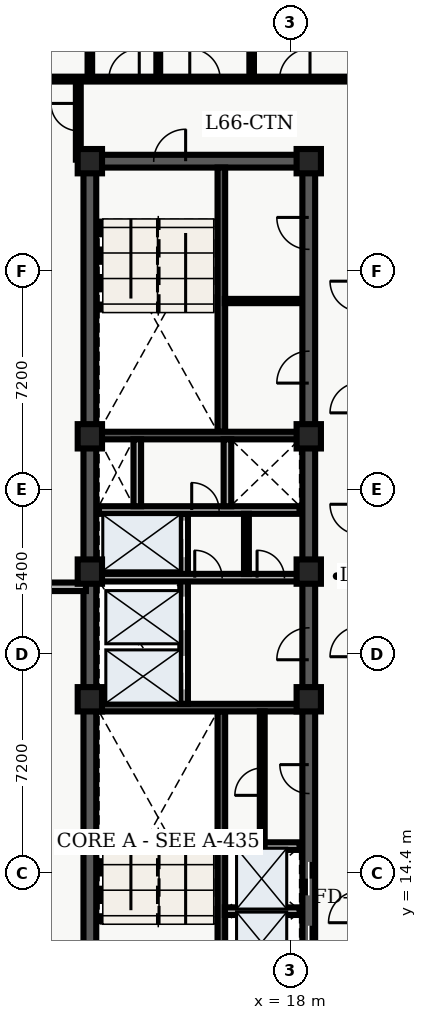
"""IFC4 building model, lengths in metres.
Left out: names, types, materials, properties, quantities, classifications, styles, units other than length and angle.
Written with IfcOpenShell. Run it as: python <this file> out.ifc"""

import sys

from ifc_helpers import new_model, entity, si_unit, converted_unit, direction, frame, origin_with_axes, origin_2d_with_axis, place, context, subcontext, project, spatial, polyline, rectangle, outline, extrude, element, fill, save


model = new_model("IFC4")
c1 = context("Model", 3, precision=1e-05, world=origin_with_axes(), true_north=direction((0.0, 1.0)))
c2 = subcontext(c1, "Body", "Model", "MODEL_VIEW")
j1 = project(units=[si_unit("LENGTHUNIT", "METRE"), converted_unit("PLANEANGLEUNIT", "DEGREE", entity("IfcPlaneAngleMeasure", 0.017), si_unit("PLANEANGLEUNIT", "RADIAN"), dimensions=[0, 0, 0, 0, 0, 0, 0])], contexts=[c1])
p1 = place(None, origin_with_axes())
s1 = spatial("IfcSite", under=j1, at=p1, CompositionType="ELEMENT")
p2 = place(p1, origin_with_axes())
s2 = spatial("IfcBuilding", under=s1, at=p2, CompositionType="ELEMENT")
p3 = place(p2, frame((0.0, 0.0, 268.5), z_axis=(0.0, 0.0, 1.0), x_axis=(1.0, 0.0, 0.0)))
s3 = spatial("IfcBuildingStorey", under=s2, at=p3, CompositionType="ELEMENT", Elevation=268.5)
p4 = place(p3, frame((11.4, 10.8, 0.0), z_axis=(0.0, 0.0, 1.0), x_axis=(0.0, 1.0, 0.0)))
e1 = element("IfcWall", 1, at=p4, inside=s3, PredefinedType="SHEAR", context=c2, shape_type="SweptSolid", body=[
    extrude(outline(polyline([(0.0, -0.21), (27.0, -0.21), (27.0, 0.21), (0.0, 0.21), (0.0, -0.21)])), origin_with_axes(), (0.0, 0.0, 1.0), 3.66),
])
p5 = place(p3, frame((11.4, 37.8, 0.0), z_axis=(0.0, 0.0, 1.0), x_axis=(1.0, 0.0, 0.0)))
e2 = element("IfcWall", 2, at=p5, inside=s3, PredefinedType="SHEAR", context=c2, shape_type="SweptSolid", body=[
    extrude(outline(polyline([(0.0, -0.21), (7.2, -0.21), (7.2, 0.21), (0.0, 0.21), (0.0, -0.21)])), origin_with_axes(), (0.0, 0.0, 1.0), 3.66),
])
p6 = place(p5, frame((2.625, 0.0, 0.0), z_axis=(0.0, 0.0, 1.0), x_axis=(1.0, 0.0, 0.0)))
e3 = element("IfcOpeningElement", 3, at=p6, cuts=e2, PredefinedType="OPENING", context=c2, shape_type="SweptSolid", body=[
    extrude(rectangle(XDim=1.05, YDim=0.44, at=origin_2d_with_axis()), origin_with_axes(), (0.0, 0.0, 1.0), 2.15),
])
p7 = place(p3, frame((18.6, 10.8, 0.0), z_axis=(0.0, 0.0, 1.0), x_axis=(0.0, 1.0, 0.0)))
e4 = element("IfcWall", 4, at=p7, inside=s3, PredefinedType="SHEAR", context=c2, shape_type="SweptSolid", body=[
    extrude(outline(polyline([(0.0, -0.21), (13.5, -0.21), (13.5, 0.21), (0.0, 0.21), (0.0, -0.21)])), origin_with_axes(), (0.0, 0.0, 1.0), 3.66),
])
p8 = place(p7, frame((1.3, 0.0, 0.0), z_axis=(0.0, 0.0, 1.0), x_axis=(1.0, 0.0, 0.0)))
e5 = element("IfcOpeningElement", 5, at=p8, cuts=e4, PredefinedType="OPENING", context=c2, shape_type="SweptSolid", body=[
    extrude(rectangle(XDim=1.1, YDim=0.44, at=origin_2d_with_axis()), origin_with_axes(), (0.0, 0.0, 1.0), 2.15),
])
p9 = place(p7, frame((3.4, 0.0, 0.0), z_axis=(0.0, 0.0, 1.0), x_axis=(1.0, 0.0, 0.0)))
e6 = element("IfcOpeningElement", 6, at=p9, cuts=e4, PredefinedType="OPENING", context=c2, shape_type="SweptSolid", body=[
    extrude(rectangle(XDim=1.1, YDim=0.44, at=origin_2d_with_axis()), origin_with_axes(), (0.0, 0.0, 1.0), 2.15),
])
p10 = place(p7, frame((11.125, 0.0, 0.0), z_axis=(0.0, 0.0, 1.0), x_axis=(1.0, 0.0, 0.0)))
e7 = element("IfcOpeningElement", 7, at=p10, cuts=e4, PredefinedType="OPENING", context=c2, shape_type="SweptSolid", body=[
    extrude(rectangle(XDim=1.05, YDim=0.44, at=origin_2d_with_axis()), origin_with_axes(), (0.0, 0.0, 1.0), 2.15),
])
p11 = place(p7, frame((6.675, 0.0, 0.0), z_axis=(0.0, 0.0, 1.0), x_axis=(1.0, 0.0, 0.0)))
e8 = element("IfcOpeningElement", 8, at=p11, cuts=e4, PredefinedType="OPENING", context=c2, shape_type="SweptSolid", body=[
    extrude(rectangle(XDim=0.95, YDim=0.44, at=origin_2d_with_axis()), origin_with_axes(), (0.0, 0.0, 1.0), 2.15),
])
p12 = place(p3, frame((18.6, 24.3, 0.0), z_axis=(0.0, 0.0, 1.0), x_axis=(0.0, 1.0, 0.0)))
e9 = element("IfcWall", 9, at=p12, inside=s3, PredefinedType="SHEAR", context=c2, shape_type="SweptSolid", body=[
    extrude(outline(polyline([(0.0, -0.21), (13.5, -0.21), (13.5, 0.21), (0.0, 0.21), (0.0, -0.21)])), origin_with_axes(), (0.0, 0.0, 1.0), 3.66),
])
p13 = place(p12, frame((6.725, 0.0, 0.0), z_axis=(0.0, 0.0, 1.0), x_axis=(1.0, 0.0, 0.0)))
e10 = element("IfcOpeningElement", 10, at=p13, cuts=e9, PredefinedType="OPENING", context=c2, shape_type="SweptSolid", body=[
    extrude(rectangle(XDim=1.05, YDim=0.44, at=origin_2d_with_axis()), origin_with_axes(), (0.0, 0.0, 1.0), 2.15),
])
p14 = place(p12, frame((11.125, 0.0, 0.0), z_axis=(0.0, 0.0, 1.0), x_axis=(1.0, 0.0, 0.0)))
e11 = element("IfcOpeningElement", 11, at=p14, cuts=e9, PredefinedType="OPENING", context=c2, shape_type="SweptSolid", body=[
    extrude(rectangle(XDim=1.05, YDim=0.44, at=origin_2d_with_axis()), origin_with_axes(), (0.0, 0.0, 1.0), 2.15),
])
p15 = place(p3, frame((15.725, 11.01, 0.0), z_axis=(0.0, 0.0, 1.0), x_axis=(0.0, 1.0, 0.0)))
e12 = element("IfcWall", 12, at=p15, inside=s3, PredefinedType="SHEAR", context=c2, shape_type="SweptSolid", body=[
    extrude(outline(polyline([(0.0, -0.125), (8.69, -0.125), (8.69, 0.125), (0.0, 0.125), (0.0, -0.125)])), origin_with_axes(), (0.0, 0.0, 1.0), 3.66),
])
p16 = place(p3, frame((11.61, 19.825, 0.0), z_axis=(0.0, 0.0, 1.0), x_axis=(1.0, 0.0, 0.0)))
e13 = element("IfcWall", 13, at=p16, inside=s3, PredefinedType="SHEAR", context=c2, shape_type="SweptSolid", body=[
    extrude(outline(polyline([(0.0, -0.125), (6.78, -0.125), (6.78, 0.125), (0.0, 0.125), (0.0, -0.125)])), origin_with_axes(), (0.0, 0.0, 1.0), 3.66),
])
p17 = place(p3, frame((15.725, 28.9, 0.0), z_axis=(0.0, 0.0, 1.0), x_axis=(0.0, 1.0, 0.0)))
e14 = element("IfcWall", 14, at=p17, inside=s3, PredefinedType="SHEAR", context=c2, shape_type="SweptSolid", body=[
    extrude(outline(polyline([(0.0, -0.125), (8.69, -0.125), (8.69, 0.125), (0.0, 0.125), (0.0, -0.125)])), origin_with_axes(), (0.0, 0.0, 1.0), 3.66),
])
p18 = place(p3, frame((11.61, 28.775, 0.0), z_axis=(0.0, 0.0, 1.0), x_axis=(1.0, 0.0, 0.0)))
e15 = element("IfcWall", 15, at=p18, inside=s3, PredefinedType="SHEAR", context=c2, shape_type="SweptSolid", body=[
    extrude(outline(polyline([(0.0, -0.125), (6.78, -0.125), (6.78, 0.125), (0.0, 0.125), (0.0, -0.125)])), origin_with_axes(), (0.0, 0.0, 1.0), 3.66),
])
p19 = place(p3, frame((14.5, 19.95, 0.0), z_axis=(0.0, 0.0, 1.0), x_axis=(0.0, 1.0, 0.0)))
e16 = element("IfcWall", 16, at=p19, inside=s3, PredefinedType="SOLIDWALL", context=c2, shape_type="SweptSolid", body=[
    extrude(outline(polyline([(0.0, -0.125), (6.25, -0.125), (6.25, 0.125), (0.0, 0.125), (0.0, -0.125)])), origin_with_axes(), (0.0, 0.0, 1.0), 2.7),
])
p20 = place(p19, frame((1.025, 0.0, 0.0), z_axis=(0.0, 0.0, 1.0), x_axis=(1.0, 0.0, 0.0)))
e17 = element("IfcOpeningElement", 17, at=p20, cuts=e16, PredefinedType="OPENING", context=c2, shape_type="SweptSolid", body=[
    extrude(rectangle(XDim=1.1, YDim=0.27, at=origin_2d_with_axis()), origin_with_axes(), (0.0, 0.0, 1.0), 2.15),
])
p21 = place(p19, frame((2.975, 0.0, 0.0), z_axis=(0.0, 0.0, 1.0), x_axis=(1.0, 0.0, 0.0)))
e18 = element("IfcOpeningElement", 18, at=p21, cuts=e16, PredefinedType="OPENING", context=c2, shape_type="SweptSolid", body=[
    extrude(rectangle(XDim=1.1, YDim=0.27, at=origin_2d_with_axis()), origin_with_axes(), (0.0, 0.0, 1.0), 2.15),
])
p22 = place(p19, frame((5.425, 0.0, 0.0), z_axis=(0.0, 0.0, 1.0), x_axis=(1.0, 0.0, 0.0)))
e19 = element("IfcOpeningElement", 19, at=p22, cuts=e16, PredefinedType="OPENING", context=c2, shape_type="SweptSolid", body=[
    extrude(rectangle(XDim=1.2, YDim=0.27, at=origin_2d_with_axis()), origin_with_axes(), (0.0, 0.0, 1.0), 2.15),
])
p23 = place(p3, frame((11.7, 24.1, 0.0), z_axis=(0.0, 0.0, 1.0), x_axis=(1.0, 0.0, 0.0)))
e20 = element("IfcWall", 20, at=p23, inside=s3, PredefinedType="SOLIDWALL", context=c2, shape_type="SweptSolid", body=[
    extrude(outline(polyline([(0.0, -0.125), (6.6, -0.125), (6.6, 0.125), (0.0, 0.125), (0.0, -0.125)])), origin_with_axes(), (0.0, 0.0, 1.0), 2.7),
])
p24 = place(p23, frame((3.6, 0.0, 0.0), z_axis=(0.0, 0.0, 1.0), x_axis=(1.0, 0.0, 0.0)))
e21 = element("IfcOpeningElement", 21, at=p24, cuts=e20, PredefinedType="OPENING", context=c2, shape_type="SweptSolid", body=[
    extrude(rectangle(XDim=0.9, YDim=0.27, at=origin_2d_with_axis()), origin_with_axes(), (0.0, 0.0, 1.0), 2.15),
])
p25 = place(p23, frame((5.65, 0.0, 0.0), z_axis=(0.0, 0.0, 1.0), x_axis=(1.0, 0.0, 0.0)))
e22 = element("IfcOpeningElement", 22, at=p25, cuts=e20, PredefinedType="OPENING", context=c2, shape_type="SweptSolid", body=[
    extrude(rectangle(XDim=0.9, YDim=0.27, at=origin_2d_with_axis()), origin_with_axes(), (0.0, 0.0, 1.0), 2.15),
])
p26 = place(p3, frame((11.7, 26.325, 0.0), z_axis=(0.0, 0.0, 1.0), x_axis=(1.0, 0.0, 0.0)))
e23 = element("IfcWall", 23, at=p26, inside=s3, PredefinedType="SOLIDWALL", context=c2, shape_type="SweptSolid", body=[
    extrude(outline(polyline([(0.0, -0.125), (6.6, -0.125), (6.6, 0.125), (0.0, 0.125), (0.0, -0.125)])), origin_with_axes(), (0.0, 0.0, 1.0), 2.7),
])
p27 = place(p26, frame((3.5, 0.0, 0.0), z_axis=(0.0, 0.0, 1.0), x_axis=(1.0, 0.0, 0.0)))
e24 = element("IfcOpeningElement", 24, at=p27, cuts=e23, PredefinedType="OPENING", context=c2, shape_type="SweptSolid", body=[
    extrude(rectangle(XDim=0.9, YDim=0.27, at=origin_2d_with_axis()), origin_with_axes(), (0.0, 0.0, 1.0), 2.15),
])
for number, where, z_axis, x_axis in (
    (25, (12.96, 26.45, 0.0), (0.0, 0.0, 1.0), (0.0, 1.0, 0.0)),
    (26, (15.925, 26.45, 0.0), (0.0, 0.0, 1.0), (0.0, 1.0, 0.0)),
):
    element("IfcWall", number, at=place(p3, frame(where, z_axis=z_axis, x_axis=x_axis)), inside=s3, PredefinedType="SOLIDWALL", context=c2, shape_type="SweptSolid", body=[
        extrude(outline(polyline([(0.0, -0.125), (2.2, -0.125), (2.2, 0.125), (0.0, 0.125), (0.0, -0.125)])), origin_with_axes(), (0.0, 0.0, 1.0), 2.7),
    ])
for number, where, z_axis, x_axis in (
    (27, (11.4, 20.1, 0.0), (0.0, 0.0, 1.0), (1.0, 0.0, 0.0)),
    (28, (11.4, 24.3, 0.0), (0.0, 0.0, 1.0), (1.0, 0.0, 0.0)),
    (29, (11.4, 28.75, 0.0), (0.0, 0.0, 1.0), (1.0, 0.0, 0.0)),
    (30, (11.4, 37.8, 0.0), (0.0, 0.0, 1.0), (1.0, 0.0, 0.0)),
    (31, (18.6, 20.1, 0.0), (0.0, 0.0, 1.0), (1.0, 0.0, 0.0)),
    (32, (18.6, 24.3, 0.0), (0.0, 0.0, 1.0), (1.0, 0.0, 0.0)),
    (33, (18.6, 28.75, 0.0), (0.0, 0.0, 1.0), (1.0, 0.0, 0.0)),
    (34, (18.6, 37.8, 0.0), (0.0, 0.0, 1.0), (1.0, 0.0, 0.0)),
):
    element("IfcColumn", number, at=place(p3, frame(where, z_axis=z_axis, x_axis=x_axis)), inside=s3, PredefinedType="COLUMN", context=c2, shape_type="SweptSolid", body=[
        extrude(rectangle(XDim=0.8, YDim=0.8, at=origin_2d_with_axis()), origin_with_axes(), (0.0, 0.0, 1.0), 3.9),
    ])
p28 = place(p3, frame((16.55, 24.22, 0.0), z_axis=(0.0, 0.0, 1.0), x_axis=(0.0, 1.0, 0.0)))
e35 = element("IfcWall", 35, at=p28, inside=s3, PredefinedType="PARTITIONING", context=c2, shape_type="SweptSolid", body=[
    extrude(outline(polyline([(0.0, -0.08), (1.98, -0.08), (1.98, 0.08), (0.0, 0.08), (0.0, -0.08)])), origin_with_axes(), (0.0, 0.0, 1.0), 2.7),
])
for number, where, z_axis, x_axis in (
    (36, (15.84, 13.13, 0.0), (0.0, 0.0, 1.0), (1.0, 0.0, 0.0)),
    (37, (15.84, 15.27, 0.0), (0.0, 0.0, 1.0), (1.0, 0.0, 0.0)),
):
    element("IfcWall", number, at=place(p3, frame(where, z_axis=z_axis, x_axis=x_axis)), inside=s3, PredefinedType="SOLIDWALL", context=c2, shape_type="SweptSolid", body=[
        extrude(outline(polyline([(0.0, -0.125), (2.46, -0.125), (2.46, 0.125), (0.0, 0.125), (0.0, -0.125)])), origin_with_axes(), (0.0, 0.0, 1.0), 2.7),
    ])
p29 = place(p3, frame((17.07, 15.34, 0.0), z_axis=(0.0, 0.0, 1.0), x_axis=(0.0, 1.0, 0.0)))
e38 = element("IfcWall", 38, at=p29, inside=s3, PredefinedType="PARTITIONING", context=c2, shape_type="SweptSolid", body=[
    extrude(outline(polyline([(0.0, -0.08), (4.36, -0.08), (4.36, 0.08), (0.0, 0.08), (0.0, -0.08)])), origin_with_axes(), (0.0, 0.0, 1.0), 2.7),
])
p30 = place(p29, frame((2.05, 0.0, 0.0), z_axis=(0.0, 0.0, 1.0), x_axis=(1.0, 0.0, 0.0)))
e39 = element("IfcOpeningElement", 39, at=p30, cuts=e38, PredefinedType="OPENING", context=c2, shape_type="SweptSolid", body=[
    extrude(rectangle(XDim=0.9, YDim=0.18, at=origin_2d_with_axis()), origin_with_axes(), (0.0, 0.0, 1.0), 2.15),
])
p31 = place(p3, frame((15.84, 33.2, 0.0), z_axis=(0.0, 0.0, 1.0), x_axis=(1.0, 0.0, 0.0)))
e40 = element("IfcWall", 40, at=p31, inside=s3, PredefinedType="PARTITIONING", context=c2, shape_type="SweptSolid", body=[
    extrude(outline(polyline([(0.0, -0.07), (2.46, -0.07), (2.46, 0.07), (0.0, 0.07), (0.0, -0.07)])), origin_with_axes(), (0.0, 0.0, 1.0), 2.7),
])
p32 = place(p3, frame((8.135, 40.5, 0.0), z_axis=(0.0, 0.0, 1.0), x_axis=(1.0, 0.0, 0.0)))
e41 = element("IfcWall", 41, at=p32, inside=s3, PredefinedType="PARTITIONING", context=c2, shape_type="SweptSolid", body=[
    extrude(outline(polyline([(0.0, -0.08), (23.93, -0.08), (23.93, 0.08), (0.0, 0.08), (0.0, -0.08)])), origin_with_axes(), (0.0, 0.0, 1.0), 2.7),
])
p33 = place(p32, frame((0.76, 0.0, 0.0), z_axis=(0.0, 0.0, 1.0), x_axis=(1.0, 0.0, 0.0)))
e42 = element("IfcOpeningElement", 42, at=p33, cuts=e41, PredefinedType="OPENING", context=c2, shape_type="SweptSolid", body=[
    extrude(rectangle(XDim=1.0, YDim=0.18, at=origin_2d_with_axis()), origin_with_axes(), (0.0, 0.0, 1.0), 2.15),
])
p34 = place(p32, frame((4.39, 0.0, 0.0), z_axis=(0.0, 0.0, 1.0), x_axis=(1.0, 0.0, 0.0)))
e43 = element("IfcOpeningElement", 43, at=p34, cuts=e41, PredefinedType="OPENING", context=c2, shape_type="SweptSolid", body=[
    extrude(rectangle(XDim=1.0, YDim=0.18, at=origin_2d_with_axis()), origin_with_axes(), (0.0, 0.0, 1.0), 2.15),
])
p35 = place(p32, frame((7.051, 0.0, 0.0), z_axis=(0.0, 0.0, 1.0), x_axis=(1.0, 0.0, 0.0)))
e44 = element("IfcOpeningElement", 44, at=p35, cuts=e41, PredefinedType="OPENING", context=c2, shape_type="SweptSolid", body=[
    extrude(rectangle(XDim=1.0, YDim=0.18, at=origin_2d_with_axis()), origin_with_axes(), (0.0, 0.0, 1.0), 2.15),
])
p36 = place(p32, frame((10.006, 0.0, 0.0), z_axis=(0.0, 0.0, 1.0), x_axis=(1.0, 0.0, 0.0)))
e45 = element("IfcOpeningElement", 45, at=p36, cuts=e41, PredefinedType="OPENING", context=c2, shape_type="SweptSolid", body=[
    extrude(rectangle(XDim=1.0, YDim=0.18, at=origin_2d_with_axis()), origin_with_axes(), (0.0, 0.0, 1.0), 2.15),
])
p37 = place(p3, frame((11.02, 37.85, 0.0), z_axis=(0.0, 0.0, 1.0), x_axis=(0.0, 1.0, 0.0)))
e46 = element("IfcWall", 46, at=p37, inside=s3, PredefinedType="PARTITIONING", context=c2, shape_type="SweptSolid", body=[
    extrude(outline(polyline([(0.0, -0.08), (2.65, -0.08), (2.65, 0.08), (0.0, 0.08), (0.0, -0.08)])), origin_with_axes(), (0.0, 0.0, 1.0), 2.7),
])
p38 = place(p37, frame((1.4, 0.0, 0.0), z_axis=(0.0, 0.0, 1.0), x_axis=(1.0, 0.0, 0.0)))
e47 = element("IfcOpeningElement", 47, at=p38, cuts=e46, PredefinedType="OPENING", context=c2, shape_type="SweptSolid", body=[
    extrude(rectangle(XDim=0.9, YDim=0.18, at=origin_2d_with_axis()), origin_with_axes(), (0.0, 0.0, 1.0), 2.15),
])
p39 = place(p3, frame((8.135, 23.8, 0.0), z_axis=(0.0, 0.0, 1.0), x_axis=(1.0, 0.0, 0.0)))
e48 = element("IfcWall", 48, at=p39, inside=s3, PredefinedType="PARTITIONING", context=c2, shape_type="SweptSolid", body=[
    extrude(outline(polyline([(0.0, -0.14), (3.135, -0.14), (3.135, 0.14), (0.0, 0.14), (0.0, -0.14)])), origin_with_axes(), (0.0, 0.0, 1.0), 2.7),
])
p40 = place(p3, frame((11.4, 40.6, 0.0), z_axis=(0.0, 0.0, 1.0), x_axis=(0.0, 1.0, 0.0)))
e49 = element("IfcWall", 49, at=p40, inside=s3, PredefinedType="PARTITIONING", context=c2, shape_type="SweptSolid", body=[
    extrude(outline(polyline([(0.0, -0.075), (5.42, -0.075), (5.42, 0.075), (0.0, 0.075), (0.0, -0.075)])), origin_with_axes(), (0.0, 0.0, 1.0), 2.7),
])
p41 = place(p3, frame((13.65, 40.6, 0.0), z_axis=(0.0, 0.0, 1.0), x_axis=(0.0, 1.0, 0.0)))
e50 = element("IfcWall", 50, at=p41, inside=s3, PredefinedType="PARTITIONING", context=c2, shape_type="SweptSolid", body=[
    extrude(outline(polyline([(0.0, -0.062), (5.42, -0.062), (5.42, 0.062), (0.0, 0.062), (0.0, -0.062)])), origin_with_axes(), (0.0, 0.0, 1.0), 2.7),
])
p42 = place(p3, frame((16.722, 40.6, 0.0), z_axis=(0.0, 0.0, 1.0), x_axis=(0.0, 1.0, 0.0)))
e51 = element("IfcWall", 51, at=p42, inside=s3, PredefinedType="PARTITIONING", context=c2, shape_type="SweptSolid", body=[
    extrude(outline(polyline([(0.0, -0.075), (5.42, -0.075), (5.42, 0.075), (0.0, 0.075), (0.0, -0.075)])), origin_with_axes(), (0.0, 0.0, 1.0), 2.7),
])
p43 = place(p7, frame((1.3, 0.0, 0.0), z_axis=(0.0, 0.0, 1.0), x_axis=(1.0, 0.0, 0.0)))
e52 = element("IfcDoor", 52, at=p43, inside=s3, OperationType="SLIDING_TO_LEFT", PredefinedType="DOOR", context=c2, shape_type="SweptSolid", body=[
    extrude(rectangle(XDim=1.1, YDim=0.09, at=origin_2d_with_axis()), origin_with_axes(), (0.0, 0.0, 1.0), 2.15),
])
fill(e5, e52)
p44 = place(p7, frame((3.4, 0.0, 0.0), z_axis=(0.0, 0.0, 1.0), x_axis=(1.0, 0.0, 0.0)))
e53 = element("IfcDoor", 53, at=p44, inside=s3, OperationType="SLIDING_TO_RIGHT", PredefinedType="DOOR", context=c2, shape_type="SweptSolid", body=[
    extrude(rectangle(XDim=1.1, YDim=0.09, at=origin_2d_with_axis()), origin_with_axes(), (0.0, 0.0, 1.0), 2.15),
])
fill(e6, e53)
p45 = place(p19, frame((1.025, 0.0, 0.0), z_axis=(0.0, 0.0, 1.0), x_axis=(1.0, 0.0, 0.0)))
e54 = element("IfcDoor", 54, at=p45, inside=s3, OperationType="SLIDING_TO_LEFT", PredefinedType="DOOR", context=c2, shape_type="SweptSolid", body=[
    extrude(rectangle(XDim=1.1, YDim=0.09, at=origin_2d_with_axis()), origin_with_axes(), (0.0, 0.0, 1.0), 2.15),
])
fill(e17, e54)
p46 = place(p19, frame((2.975, 0.0, 0.0), z_axis=(0.0, 0.0, 1.0), x_axis=(1.0, 0.0, 0.0)))
e55 = element("IfcDoor", 55, at=p46, inside=s3, OperationType="SLIDING_TO_RIGHT", PredefinedType="DOOR", context=c2, shape_type="SweptSolid", body=[
    extrude(rectangle(XDim=1.1, YDim=0.09, at=origin_2d_with_axis()), origin_with_axes(), (0.0, 0.0, 1.0), 2.15),
])
fill(e18, e55)
p47 = place(p19, frame((5.425, 0.0, 0.0), z_axis=(0.0, 0.0, 1.0), x_axis=(1.0, 0.0, 0.0)))
e56 = element("IfcDoor", 56, at=p47, inside=s3, OperationType="DOUBLE_DOOR_SLIDING", PredefinedType="DOOR", context=c2, shape_type="SweptSolid", body=[
    extrude(rectangle(XDim=1.2, YDim=0.09, at=origin_2d_with_axis()), origin_with_axes(), (0.0, 0.0, 1.0), 2.15),
])
fill(e19, e56)
p48 = place(p5, frame((2.625, 0.0, 0.0), z_axis=(0.0, 0.0, 1.0), x_axis=(1.0, 0.0, 0.0)))
e57 = element("IfcDoor", 57, at=p48, inside=s3, OperationType="SINGLE_SWING_RIGHT", PredefinedType="DOOR", context=c2, shape_type="SweptSolid", body=[
    extrude(rectangle(XDim=1.05, YDim=0.09, at=origin_2d_with_axis()), origin_with_axes(), (0.0, 0.0, 1.0), 2.15),
])
fill(e3, e57)
p49 = place(p7, frame((11.125, 0.0, 0.0), z_axis=(0.0, 0.0, 1.0), x_axis=(1.0, 0.0, 0.0)))
e58 = element("IfcDoor", 58, at=p49, inside=s3, OperationType="SINGLE_SWING_LEFT", PredefinedType="DOOR", context=c2, shape_type="SweptSolid", body=[
    extrude(rectangle(XDim=1.05, YDim=0.09, at=origin_2d_with_axis()), origin_with_axes(), (0.0, 0.0, 1.0), 2.15),
])
fill(e7, e58)
p50 = place(p23, frame((3.6, 0.0, 0.0), z_axis=(0.0, 0.0, 1.0), x_axis=(1.0, 0.0, 0.0)))
e59 = element("IfcDoor", 59, at=p50, inside=s3, OperationType="SINGLE_SWING_LEFT", PredefinedType="DOOR", context=c2, shape_type="SweptSolid", body=[
    extrude(rectangle(XDim=0.9, YDim=0.09, at=origin_2d_with_axis()), origin_with_axes(), (0.0, 0.0, 1.0), 2.15),
])
fill(e21, e59)
p51 = place(p23, frame((5.65, 0.0, 0.0), z_axis=(0.0, 0.0, 1.0), x_axis=(1.0, 0.0, 0.0)))
e60 = element("IfcDoor", 60, at=p51, inside=s3, OperationType="SINGLE_SWING_LEFT", PredefinedType="DOOR", context=c2, shape_type="SweptSolid", body=[
    extrude(rectangle(XDim=0.9, YDim=0.09, at=origin_2d_with_axis()), origin_with_axes(), (0.0, 0.0, 1.0), 2.15),
])
fill(e22, e60)
p52 = place(p26, frame((3.5, 0.0, 0.0), z_axis=(0.0, 0.0, 1.0), x_axis=(1.0, 0.0, 0.0)))
e61 = element("IfcDoor", 61, at=p52, inside=s3, OperationType="SINGLE_SWING_LEFT", PredefinedType="DOOR", context=c2, shape_type="SweptSolid", body=[
    extrude(rectangle(XDim=0.9, YDim=0.09, at=origin_2d_with_axis()), origin_with_axes(), (0.0, 0.0, 1.0), 2.15),
])
fill(e24, e61)
p53 = place(p29, frame((2.05, 0.0, 0.0), z_axis=(0.0, 0.0, 1.0), x_axis=(1.0, 0.0, 0.0)))
e62 = element("IfcDoor", 62, at=p53, inside=s3, OperationType="SINGLE_SWING_LEFT", PredefinedType="DOOR", context=c2, shape_type="SweptSolid", body=[
    extrude(rectangle(XDim=0.9, YDim=0.09, at=origin_2d_with_axis()), origin_with_axes(), (0.0, 0.0, 1.0), 2.15),
])
fill(e39, e62)
p54 = place(p7, frame((6.675, 0.0, 0.0), z_axis=(0.0, 0.0, 1.0), x_axis=(1.0, 0.0, 0.0)))
e63 = element("IfcDoor", 63, at=p54, inside=s3, OperationType="SINGLE_SWING_RIGHT", PredefinedType="DOOR", context=c2, shape_type="SweptSolid", body=[
    extrude(rectangle(XDim=0.95, YDim=0.09, at=origin_2d_with_axis()), origin_with_axes(), (0.0, 0.0, 1.0), 2.15),
])
fill(e8, e63)
p55 = place(p12, frame((6.725, 0.0, 0.0), z_axis=(0.0, 0.0, 1.0), x_axis=(1.0, 0.0, 0.0)))
e64 = element("IfcDoor", 64, at=p55, inside=s3, OperationType="SINGLE_SWING_LEFT", PredefinedType="DOOR", context=c2, shape_type="SweptSolid", body=[
    extrude(rectangle(XDim=1.05, YDim=0.09, at=origin_2d_with_axis()), origin_with_axes(), (0.0, 0.0, 1.0), 2.15),
])
fill(e10, e64)
p56 = place(p12, frame((11.125, 0.0, 0.0), z_axis=(0.0, 0.0, 1.0), x_axis=(1.0, 0.0, 0.0)))
e65 = element("IfcDoor", 65, at=p56, inside=s3, OperationType="SINGLE_SWING_RIGHT", PredefinedType="DOOR", context=c2, shape_type="SweptSolid", body=[
    extrude(rectangle(XDim=1.05, YDim=0.09, at=origin_2d_with_axis()), origin_with_axes(), (0.0, 0.0, 1.0), 2.15),
])
fill(e11, e65)
p57 = place(p37, frame((1.4, 0.0, 0.0), z_axis=(0.0, 0.0, 1.0), x_axis=(1.0, 0.0, 0.0)))
e66 = element("IfcDoor", 66, at=p57, inside=s3, OperationType="SINGLE_SWING_RIGHT", PredefinedType="DOOR", context=c2, shape_type="SweptSolid", body=[
    extrude(rectangle(XDim=0.9, YDim=0.09, at=origin_2d_with_axis()), origin_with_axes(), (0.0, 0.0, 1.0), 2.15),
])
fill(e47, e66)
p58 = place(p32, frame((4.39, 0.0, 0.0), z_axis=(0.0, 0.0, 1.0), x_axis=(1.0, 0.0, 0.0)))
e67 = element("IfcDoor", 67, at=p58, inside=s3, OperationType="SINGLE_SWING_RIGHT", PredefinedType="DOOR", context=c2, shape_type="SweptSolid", body=[
    extrude(rectangle(XDim=1.0, YDim=0.09, at=origin_2d_with_axis()), origin_with_axes(), (0.0, 0.0, 1.0), 2.15),
])
fill(e43, e67)
p59 = place(p32, frame((7.051, 0.0, 0.0), z_axis=(0.0, 0.0, 1.0), x_axis=(1.0, 0.0, 0.0)))
e68 = element("IfcDoor", 68, at=p59, inside=s3, OperationType="SINGLE_SWING_LEFT", PredefinedType="DOOR", context=c2, shape_type="SweptSolid", body=[
    extrude(rectangle(XDim=1.0, YDim=0.09, at=origin_2d_with_axis()), origin_with_axes(), (0.0, 0.0, 1.0), 2.15),
])
fill(e44, e68)
p60 = place(p32, frame((10.006, 0.0, 0.0), z_axis=(0.0, 0.0, 1.0), x_axis=(1.0, 0.0, 0.0)))
e69 = element("IfcDoor", 69, at=p60, inside=s3, OperationType="SINGLE_SWING_RIGHT", PredefinedType="DOOR", context=c2, shape_type="SweptSolid", body=[
    extrude(rectangle(XDim=1.0, YDim=0.09, at=origin_2d_with_axis()), origin_with_axes(), (0.0, 0.0, 1.0), 2.15),
])
fill(e45, e69)
save(model, sys.argv[1])
